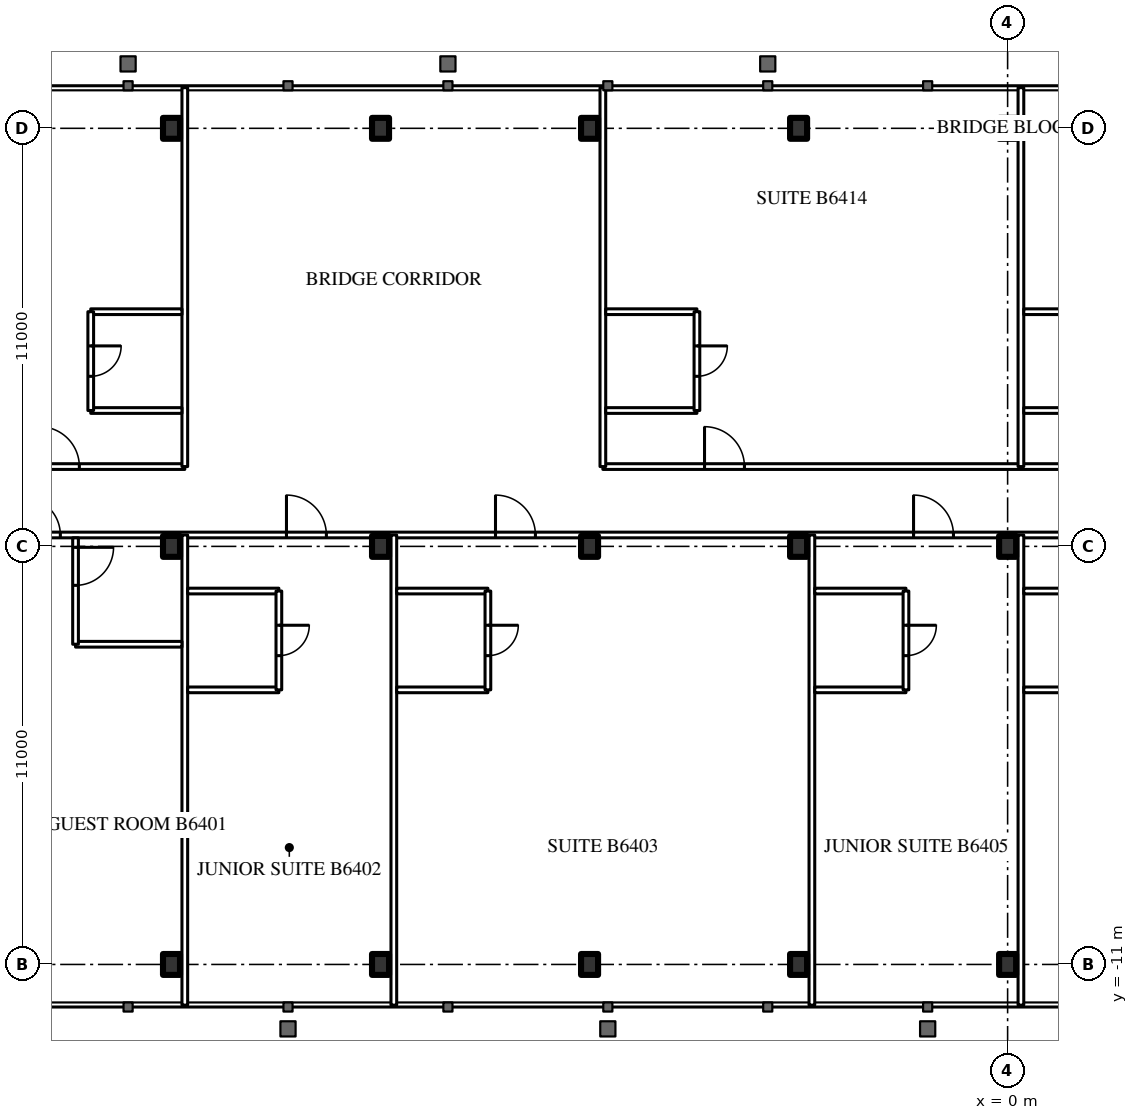
"""IFC4 building model, lengths in metres.
Left out: names, types, materials, properties, quantities, classifications, styles, units other than length and angle.
Written with IfcOpenShell. Run it as: python <this file> out.ifc"""

import sys

from ifc_helpers import new_model, si_unit, direction, frame, frame_2d, origin, origin_2d, place, context, subcontext, project, spatial, rectangle, i_section, extrude, element, fill, save


model = new_model("IFC4")
c1 = context("Model", 3, precision=1e-05, world=origin(), true_north=direction((0.0, 1.0)))
c2 = subcontext(c1, "Body", "Model", "MODEL_VIEW")
j1 = project(units=[si_unit("LENGTHUNIT", "METRE"), si_unit("PLANEANGLEUNIT", "RADIAN")], contexts=[c1])
p1 = place(None, origin())
s1 = spatial("IfcSite", under=j1, at=p1, CompositionType="ELEMENT")
p2 = place(p1, origin())
s2 = spatial("IfcBuilding", under=s1, at=p2, CompositionType="ELEMENT")
p3 = place(p2, frame((0.0, 0.0, 240.5)))
s3 = spatial("IfcBuildingStorey", under=s2, at=p3, CompositionType="ELEMENT", Elevation=240.5)
for number, where, z_axis, x_axis in (
    (1, (-22.0, -11.0, 0.0), (0.0, 0.0, 1.0), (1.0, 0.0, 0.0)),
    (2, (-16.5, -11.0, 0.0), (0.0, 0.0, 1.0), (1.0, 0.0, 0.0)),
    (3, (-11.0, -11.0, 0.0), (0.0, 0.0, 1.0), (1.0, 0.0, 0.0)),
    (4, (-5.5, -11.0, 0.0), (0.0, 0.0, 1.0), (1.0, 0.0, 0.0)),
    (5, (0.0, -11.0, 0.0), (0.0, 0.0, 1.0), (1.0, 0.0, 0.0)),
    (6, (-22.0, 0.0, 0.0), (0.0, 0.0, 1.0), (1.0, 0.0, 0.0)),
    (7, (-16.5, 0.0, 0.0), (0.0, 0.0, 1.0), (1.0, 0.0, 0.0)),
    (8, (-11.0, 0.0, 0.0), (0.0, 0.0, 1.0), (1.0, 0.0, 0.0)),
    (9, (-5.5, 0.0, 0.0), (0.0, 0.0, 1.0), (1.0, 0.0, 0.0)),
    (10, (0.0, 0.0, 0.0), (0.0, 0.0, 1.0), (1.0, 0.0, 0.0)),
    (11, (-22.0, 11.0, 0.0), (0.0, 0.0, 1.0), (1.0, 0.0, 0.0)),
    (12, (-16.5, 11.0, 0.0), (0.0, 0.0, 1.0), (1.0, 0.0, 0.0)),
    (13, (-11.0, 11.0, 0.0), (0.0, 0.0, 1.0), (1.0, 0.0, 0.0)),
    (14, (-5.5, 11.0, 0.0), (0.0, 0.0, 1.0), (1.0, 0.0, 0.0)),
    (15, (0.0, 11.0, 0.0), (0.0, 0.0, 1.0), (1.0, 0.0, 0.0)),
):
    element("IfcColumn", number, at=place(p3, frame(where, z_axis=z_axis, x_axis=x_axis)), inside=s3, PredefinedType="COLUMN", context=c2, shape_type="SweptSolid", body=[
        extrude(i_section(OverallWidth=0.448, OverallDepth=0.55, WebThickness=0.072, FlangeThickness=0.115, FilletRadius=0.02, at=origin_2d()), origin(), (0.0, 0.0, 1.0), 3.6),
    ])
p4 = place(p3, frame((-27.5, 0.3, 0.0), z_axis=(0.0, 0.0, 1.0), x_axis=(1.0, 0.0, 0.0)))
e16 = element("IfcWall", 16, at=p4, inside=s3, PredefinedType="PARTITIONING", context=c2, shape_type="SweptSolid", body=[
    extrude(rectangle(XDim=55.0, YDim=0.15, at=frame_2d((27.5, 0.0))), origin(), (0.0, 0.0, 1.0), 2.4),
])
p5 = place(p4, frame((1.575, 0.0, 0.0)))
e17 = element("IfcOpeningElement", 17, at=p5, cuts=e16, PredefinedType="OPENING", context=c2, shape_type="SweptSolid", body=[
    extrude(rectangle(XDim=1.0, YDim=2.2, at=frame_2d((0.5, 1.1))), frame((0.0, 0.085, 0.0), z_axis=(0.0, -1.0, 0.0), x_axis=(1.0, 0.0, 0.0)), (0.0, 0.0, 1.0), 0.17),
])
p6 = place(p4, frame((8.525, 0.0, 0.0)))
e18 = element("IfcOpeningElement", 18, at=p6, cuts=e16, PredefinedType="OPENING", context=c2, shape_type="SweptSolid", body=[
    extrude(rectangle(XDim=1.05, YDim=2.4, at=frame_2d((0.525, 1.2))), frame((0.0, 0.085, 0.0), z_axis=(0.0, -1.0, 0.0), x_axis=(1.0, 0.0, 0.0)), (0.0, 0.0, 1.0), 0.17),
])
p7 = place(p4, frame((14.025, 0.0, 0.0)))
e19 = element("IfcOpeningElement", 19, at=p7, cuts=e16, PredefinedType="OPENING", context=c2, shape_type="SweptSolid", body=[
    extrude(rectangle(XDim=1.05, YDim=2.4, at=frame_2d((0.525, 1.2))), frame((0.0, 0.085, 0.0), z_axis=(0.0, -1.0, 0.0), x_axis=(1.0, 0.0, 0.0)), (0.0, 0.0, 1.0), 0.17),
])
p8 = place(p4, frame((25.025, 0.0, 0.0)))
e20 = element("IfcOpeningElement", 20, at=p8, cuts=e16, PredefinedType="OPENING", context=c2, shape_type="SweptSolid", body=[
    extrude(rectangle(XDim=1.05, YDim=2.4, at=frame_2d((0.525, 1.2))), frame((0.0, 0.085, 0.0), z_axis=(0.0, -1.0, 0.0), x_axis=(1.0, 0.0, 0.0)), (0.0, 0.0, 1.0), 0.17),
])
p9 = place(p4, frame((30.525, 0.0, 0.0)))
e21 = element("IfcOpeningElement", 21, at=p9, cuts=e16, PredefinedType="OPENING", context=c2, shape_type="SweptSolid", body=[
    extrude(rectangle(XDim=1.05, YDim=2.4, at=frame_2d((0.525, 1.2))), frame((0.0, 0.085, 0.0), z_axis=(0.0, -1.0, 0.0), x_axis=(1.0, 0.0, 0.0)), (0.0, 0.0, 1.0), 0.17),
])
p10 = place(p4, frame((41.525, 0.0, 0.0)))
e22 = element("IfcOpeningElement", 22, at=p10, cuts=e16, PredefinedType="OPENING", context=c2, shape_type="SweptSolid", body=[
    extrude(rectangle(XDim=1.05, YDim=2.4, at=frame_2d((0.525, 1.2))), frame((0.0, 0.085, 0.0), z_axis=(0.0, -1.0, 0.0), x_axis=(1.0, 0.0, 0.0)), (0.0, 0.0, 1.0), 0.17),
])
p11 = place(p4, frame((47.025, 0.0, 0.0)))
e23 = element("IfcOpeningElement", 23, at=p11, cuts=e16, PredefinedType="OPENING", context=c2, shape_type="SweptSolid", body=[
    extrude(rectangle(XDim=1.05, YDim=2.4, at=frame_2d((0.525, 1.2))), frame((0.0, 0.085, 0.0), z_axis=(0.0, -1.0, 0.0), x_axis=(1.0, 0.0, 0.0)), (0.0, 0.0, 1.0), 0.17),
])
p12 = place(p4, frame((52.525, 0.0, 0.0)))
e24 = element("IfcOpeningElement", 24, at=p12, cuts=e16, PredefinedType="OPENING", context=c2, shape_type="SweptSolid", body=[
    extrude(rectangle(XDim=1.05, YDim=2.4, at=frame_2d((0.525, 1.2))), frame((0.0, 0.085, 0.0), z_axis=(0.0, -1.0, 0.0), x_axis=(1.0, 0.0, 0.0)), (0.0, 0.0, 1.0), 0.17),
])
p13 = place(p3, frame((-27.5, 2.1, 0.0), z_axis=(0.0, 0.0, 1.0), x_axis=(1.0, 0.0, 0.0)))
e25 = element("IfcWall", 25, at=p13, inside=s3, PredefinedType="PARTITIONING", context=c2, shape_type="SweptSolid", body=[
    extrude(rectangle(XDim=5.85, YDim=0.15, at=frame_2d((2.925, 0.0))), origin(), (0.0, 0.0, 1.0), 3.4),
])
p14 = place(p13, frame((2.025, 0.0, 0.0)))
e26 = element("IfcOpeningElement", 26, at=p14, cuts=e25, PredefinedType="OPENING", context=c2, shape_type="SweptSolid", body=[
    extrude(rectangle(XDim=1.05, YDim=2.4, at=frame_2d((0.525, 1.2))), frame((0.0, 0.085, 0.0), z_axis=(0.0, -1.0, 0.0), x_axis=(1.0, 0.0, 0.0)), (0.0, 0.0, 1.0), 0.17),
])
p15 = place(p3, frame((-10.65, 2.1, 0.0), z_axis=(0.0, 0.0, 1.0), x_axis=(1.0, 0.0, 0.0)))
e27 = element("IfcWall", 27, at=p15, inside=s3, PredefinedType="PARTITIONING", context=c2, shape_type="SweptSolid", body=[
    extrude(rectangle(XDim=38.15, YDim=0.15, at=frame_2d((19.075, 0.0))), origin(), (0.0, 0.0, 1.0), 3.4),
])
p16 = place(p15, frame((2.675, 0.0, 0.0)))
e28 = element("IfcOpeningElement", 28, at=p16, cuts=e27, PredefinedType="OPENING", context=c2, shape_type="SweptSolid", body=[
    extrude(rectangle(XDim=1.05, YDim=2.4, at=frame_2d((0.525, 1.2))), frame((0.0, 0.085, 0.0), z_axis=(0.0, -1.0, 0.0), x_axis=(1.0, 0.0, 0.0)), (0.0, 0.0, 1.0), 0.17),
])
p17 = place(p15, frame((13.675, 0.0, 0.0)))
e29 = element("IfcOpeningElement", 29, at=p17, cuts=e27, PredefinedType="OPENING", context=c2, shape_type="SweptSolid", body=[
    extrude(rectangle(XDim=1.05, YDim=2.4, at=frame_2d((0.525, 1.2))), frame((0.0, 0.085, 0.0), z_axis=(0.0, -1.0, 0.0), x_axis=(1.0, 0.0, 0.0)), (0.0, 0.0, 1.0), 0.17),
])
p18 = place(p15, frame((24.675, 0.0, 0.0)))
e30 = element("IfcOpeningElement", 30, at=p18, cuts=e27, PredefinedType="OPENING", context=c2, shape_type="SweptSolid", body=[
    extrude(rectangle(XDim=1.05, YDim=2.4, at=frame_2d((0.525, 1.2))), frame((0.0, 0.085, 0.0), z_axis=(0.0, -1.0, 0.0), x_axis=(1.0, 0.0, 0.0)), (0.0, 0.0, 1.0), 0.17),
])
p19 = place(p15, frame((30.175, 0.0, 0.0)))
e31 = element("IfcOpeningElement", 31, at=p19, cuts=e27, PredefinedType="OPENING", context=c2, shape_type="SweptSolid", body=[
    extrude(rectangle(XDim=1.05, YDim=2.4, at=frame_2d((0.525, 1.2))), frame((0.0, 0.085, 0.0), z_axis=(0.0, -1.0, 0.0), x_axis=(1.0, 0.0, 0.0)), (0.0, 0.0, 1.0), 0.17),
])
p20 = place(p15, frame((35.675, 0.0, 0.0)))
e32 = element("IfcOpeningElement", 32, at=p20, cuts=e27, PredefinedType="OPENING", context=c2, shape_type="SweptSolid", body=[
    extrude(rectangle(XDim=1.05, YDim=2.4, at=frame_2d((0.525, 1.2))), frame((0.0, 0.085, 0.0), z_axis=(0.0, -1.0, 0.0), x_axis=(1.0, 0.0, 0.0)), (0.0, 0.0, 1.0), 0.17),
])
for number, where, z_axis, x_axis in (
    (33, (-21.65, -12.07, 0.0), (0.0, 0.0, 1.0), (0.0, 1.0, 0.0)),
    (34, (-16.15, -12.07, 0.0), (0.0, 0.0, 1.0), (0.0, 1.0, 0.0)),
    (35, (-5.15, -12.07, 0.0), (0.0, 0.0, 1.0), (0.0, 1.0, 0.0)),
    (36, (0.35, -12.07, 0.0), (0.0, 0.0, 1.0), (0.0, 1.0, 0.0)),
):
    element("IfcWall", number, at=place(p3, frame(where, z_axis=z_axis, x_axis=x_axis)), inside=s3, PredefinedType="PARTITIONING", context=c2, shape_type="SweptSolid", body=[
        extrude(rectangle(XDim=12.37, YDim=0.15, at=frame_2d((6.185, 0.0))), origin(), (0.0, 0.0, 1.0), 3.4),
    ])
p21 = place(p3, frame((-24.525, -2.575, 0.0), z_axis=(0.0, 0.0, 1.0), x_axis=(1.0, 0.0, 0.0)))
e37 = element("IfcWall", 37, at=p21, inside=s3, PredefinedType="PARTITIONING", context=c2, shape_type="SweptSolid", body=[
    extrude(rectangle(XDim=2.8, YDim=0.15, at=frame_2d((1.4, 0.0))), origin(), (0.0, 0.0, 1.0), 3.4),
])
p22 = place(p3, frame((-24.525, -2.575, 0.0), z_axis=(0.0, 0.0, 1.0), x_axis=(0.0, 1.0, 0.0)))
e38 = element("IfcWall", 38, at=p22, inside=s3, PredefinedType="PARTITIONING", context=c2, shape_type="SweptSolid", body=[
    extrude(rectangle(XDim=2.8, YDim=0.15, at=frame_2d((1.4, 0.0))), origin(), (0.0, 0.0, 1.0), 3.4),
])
p23 = place(p22, frame((1.55, 0.0, 0.0)))
e39 = element("IfcOpeningElement", 39, at=p23, cuts=e38, PredefinedType="OPENING", context=c2, shape_type="SweptSolid", body=[
    extrude(rectangle(XDim=1.0, YDim=2.2, at=frame_2d((0.5, 1.1))), frame((0.0, 0.085, 0.0), z_axis=(0.0, -1.0, 0.0), x_axis=(1.0, 0.0, 0.0)), (0.0, 0.0, 1.0), 0.17),
])
for number, where, z_axis, x_axis in (
    (40, (-21.575, -3.775, 0.0), (0.0, 0.0, 1.0), (1.0, 0.0, 0.0)),
    (41, (-21.575, -1.175, 0.0), (0.0, 0.0, 1.0), (1.0, 0.0, 0.0)),
):
    element("IfcWall", number, at=place(p3, frame(where, z_axis=z_axis, x_axis=x_axis)), inside=s3, PredefinedType="PARTITIONING", context=c2, shape_type="SweptSolid", body=[
        extrude(rectangle(XDim=2.4, YDim=0.15, at=frame_2d((1.2, 0.0))), origin(), (0.0, 0.0, 1.0), 3.4),
    ])
p24 = place(p3, frame((-19.175, -3.775, 0.0), z_axis=(0.0, 0.0, 1.0), x_axis=(0.0, 1.0, 0.0)))
e42 = element("IfcWall", 42, at=p24, inside=s3, PredefinedType="PARTITIONING", context=c2, shape_type="SweptSolid", body=[
    extrude(rectangle(XDim=2.6, YDim=0.15, at=frame_2d((1.3, 0.0))), origin(), (0.0, 0.0, 1.0), 3.4),
])
p25 = place(p24, frame((0.9, 0.0, 0.0)))
e43 = element("IfcOpeningElement", 43, at=p25, cuts=e42, PredefinedType="OPENING", context=c2, shape_type="SweptSolid", body=[
    extrude(rectangle(XDim=0.8, YDim=2.2, at=frame_2d((0.4, 1.1))), frame((0.0, 0.085, 0.0), z_axis=(0.0, -1.0, 0.0), x_axis=(1.0, 0.0, 0.0)), (0.0, 0.0, 1.0), 0.17),
])
for number, where, z_axis, x_axis in (
    (44, (-16.075, -3.775, 0.0), (0.0, 0.0, 1.0), (1.0, 0.0, 0.0)),
    (45, (-16.075, -1.175, 0.0), (0.0, 0.0, 1.0), (1.0, 0.0, 0.0)),
):
    element("IfcWall", number, at=place(p3, frame(where, z_axis=z_axis, x_axis=x_axis)), inside=s3, PredefinedType="PARTITIONING", context=c2, shape_type="SweptSolid", body=[
        extrude(rectangle(XDim=2.4, YDim=0.15, at=frame_2d((1.2, 0.0))), origin(), (0.0, 0.0, 1.0), 3.4),
    ])
p26 = place(p3, frame((-13.675, -3.775, 0.0), z_axis=(0.0, 0.0, 1.0), x_axis=(0.0, 1.0, 0.0)))
e46 = element("IfcWall", 46, at=p26, inside=s3, PredefinedType="PARTITIONING", context=c2, shape_type="SweptSolid", body=[
    extrude(rectangle(XDim=2.6, YDim=0.15, at=frame_2d((1.3, 0.0))), origin(), (0.0, 0.0, 1.0), 3.4),
])
p27 = place(p26, frame((0.9, 0.0, 0.0)))
e47 = element("IfcOpeningElement", 47, at=p27, cuts=e46, PredefinedType="OPENING", context=c2, shape_type="SweptSolid", body=[
    extrude(rectangle(XDim=0.8, YDim=2.2, at=frame_2d((0.4, 1.1))), frame((0.0, 0.085, 0.0), z_axis=(0.0, -1.0, 0.0), x_axis=(1.0, 0.0, 0.0)), (0.0, 0.0, 1.0), 0.17),
])
for number, where, z_axis, x_axis in (
    (48, (-5.075, -3.775, 0.0), (0.0, 0.0, 1.0), (1.0, 0.0, 0.0)),
    (49, (-5.075, -1.175, 0.0), (0.0, 0.0, 1.0), (1.0, 0.0, 0.0)),
):
    element("IfcWall", number, at=place(p3, frame(where, z_axis=z_axis, x_axis=x_axis)), inside=s3, PredefinedType="PARTITIONING", context=c2, shape_type="SweptSolid", body=[
        extrude(rectangle(XDim=2.4, YDim=0.15, at=frame_2d((1.2, 0.0))), origin(), (0.0, 0.0, 1.0), 3.4),
    ])
p28 = place(p3, frame((-2.675, -3.775, 0.0), z_axis=(0.0, 0.0, 1.0), x_axis=(0.0, 1.0, 0.0)))
e50 = element("IfcWall", 50, at=p28, inside=s3, PredefinedType="PARTITIONING", context=c2, shape_type="SweptSolid", body=[
    extrude(rectangle(XDim=2.6, YDim=0.15, at=frame_2d((1.3, 0.0))), origin(), (0.0, 0.0, 1.0), 3.4),
])
p29 = place(p28, frame((0.9, 0.0, 0.0)))
e51 = element("IfcOpeningElement", 51, at=p29, cuts=e50, PredefinedType="OPENING", context=c2, shape_type="SweptSolid", body=[
    extrude(rectangle(XDim=0.8, YDim=2.2, at=frame_2d((0.4, 1.1))), frame((0.0, 0.085, 0.0), z_axis=(0.0, -1.0, 0.0), x_axis=(1.0, 0.0, 0.0)), (0.0, 0.0, 1.0), 0.17),
])
for number, where, z_axis, x_axis in (
    (52, (0.425, -3.775, 0.0), (0.0, 0.0, 1.0), (1.0, 0.0, 0.0)),
    (53, (0.425, -1.175, 0.0), (0.0, 0.0, 1.0), (1.0, 0.0, 0.0)),
):
    element("IfcWall", number, at=place(p3, frame(where, z_axis=z_axis, x_axis=x_axis)), inside=s3, PredefinedType="PARTITIONING", context=c2, shape_type="SweptSolid", body=[
        extrude(rectangle(XDim=2.4, YDim=0.15, at=frame_2d((1.2, 0.0))), origin(), (0.0, 0.0, 1.0), 3.4),
    ])
for number, where, z_axis, x_axis in (
    (54, (-21.65, 2.1, 0.0), (0.0, 0.0, 1.0), (0.0, 1.0, 0.0)),
    (55, (-10.65, 2.1, 0.0), (0.0, 0.0, 1.0), (0.0, 1.0, 0.0)),
    (56, (0.35, 2.1, 0.0), (0.0, 0.0, 1.0), (0.0, 1.0, 0.0)),
):
    element("IfcWall", number, at=place(p3, frame(where, z_axis=z_axis, x_axis=x_axis)), inside=s3, PredefinedType="PARTITIONING", context=c2, shape_type="SweptSolid", body=[
        extrude(rectangle(XDim=9.97, YDim=0.15, at=frame_2d((4.985, 0.0))), origin(), (0.0, 0.0, 1.0), 3.4),
    ])
for number, where, z_axis, x_axis in (
    (57, (-24.125, 6.175, 0.0), (0.0, 0.0, 1.0), (1.0, 0.0, 0.0)),
    (58, (-24.125, 3.575, 0.0), (0.0, 0.0, 1.0), (1.0, 0.0, 0.0)),
):
    element("IfcWall", number, at=place(p3, frame(where, z_axis=z_axis, x_axis=x_axis)), inside=s3, PredefinedType="PARTITIONING", context=c2, shape_type="SweptSolid", body=[
        extrude(rectangle(XDim=2.4, YDim=0.15, at=frame_2d((1.2, 0.0))), origin(), (0.0, 0.0, 1.0), 3.4),
    ])
p30 = place(p3, frame((-24.125, 3.575, 0.0), z_axis=(0.0, 0.0, 1.0), x_axis=(0.0, 1.0, 0.0)))
e59 = element("IfcWall", 59, at=p30, inside=s3, PredefinedType="PARTITIONING", context=c2, shape_type="SweptSolid", body=[
    extrude(rectangle(XDim=2.6, YDim=0.15, at=frame_2d((1.3, 0.0))), origin(), (0.0, 0.0, 1.0), 3.4),
])
p31 = place(p30, frame((0.9, 0.0, 0.0)))
e60 = element("IfcOpeningElement", 60, at=p31, cuts=e59, PredefinedType="OPENING", context=c2, shape_type="SweptSolid", body=[
    extrude(rectangle(XDim=0.8, YDim=2.2, at=frame_2d((0.4, 1.1))), frame((0.0, 0.085, 0.0), z_axis=(0.0, -1.0, 0.0), x_axis=(1.0, 0.0, 0.0)), (0.0, 0.0, 1.0), 0.17),
])
for number, where, z_axis, x_axis in (
    (61, (-10.575, 6.175, 0.0), (0.0, 0.0, 1.0), (1.0, 0.0, 0.0)),
    (62, (-10.575, 3.575, 0.0), (0.0, 0.0, 1.0), (1.0, 0.0, 0.0)),
):
    element("IfcWall", number, at=place(p3, frame(where, z_axis=z_axis, x_axis=x_axis)), inside=s3, PredefinedType="PARTITIONING", context=c2, shape_type="SweptSolid", body=[
        extrude(rectangle(XDim=2.4, YDim=0.15, at=frame_2d((1.2, 0.0))), origin(), (0.0, 0.0, 1.0), 3.4),
    ])
p32 = place(p3, frame((-8.175, 3.575, 0.0), z_axis=(0.0, 0.0, 1.0), x_axis=(0.0, 1.0, 0.0)))
e63 = element("IfcWall", 63, at=p32, inside=s3, PredefinedType="PARTITIONING", context=c2, shape_type="SweptSolid", body=[
    extrude(rectangle(XDim=2.6, YDim=0.15, at=frame_2d((1.3, 0.0))), origin(), (0.0, 0.0, 1.0), 3.4),
])
p33 = place(p32, frame((0.9, 0.0, 0.0)))
e64 = element("IfcOpeningElement", 64, at=p33, cuts=e63, PredefinedType="OPENING", context=c2, shape_type="SweptSolid", body=[
    extrude(rectangle(XDim=0.8, YDim=2.2, at=frame_2d((0.4, 1.1))), frame((0.0, 0.085, 0.0), z_axis=(0.0, -1.0, 0.0), x_axis=(1.0, 0.0, 0.0)), (0.0, 0.0, 1.0), 0.17),
])
for number, where, z_axis, x_axis in (
    (65, (0.425, 6.175, 0.0), (0.0, 0.0, 1.0), (1.0, 0.0, 0.0)),
    (66, (0.425, 3.575, 0.0), (0.0, 0.0, 1.0), (1.0, 0.0, 0.0)),
):
    element("IfcWall", number, at=place(p3, frame(where, z_axis=z_axis, x_axis=x_axis)), inside=s3, PredefinedType="PARTITIONING", context=c2, shape_type="SweptSolid", body=[
        extrude(rectangle(XDim=2.4, YDim=0.15, at=frame_2d((1.2, 0.0))), origin(), (0.0, 0.0, 1.0), 3.4),
    ])
p34 = place(p23, origin())
e67 = element("IfcDoor", 67, at=p34, inside=s3, OperationType="SINGLE_SWING_RIGHT", PredefinedType="DOOR", context=c2, shape_type="SweptSolid", body=[
    extrude(rectangle(XDim=1.0, YDim=2.2, at=frame_2d((0.5, 1.1))), frame((0.0, 0.025, 0.0), z_axis=(0.0, -1.0, 0.0), x_axis=(1.0, 0.0, 0.0)), (0.0, 0.0, 1.0), 0.05),
])
fill(e39, e67)
p35 = place(p5, origin())
e68 = element("IfcDoor", 68, at=p35, inside=s3, OperationType="SINGLE_SWING_LEFT", PredefinedType="DOOR", context=c2, shape_type="SweptSolid", body=[
    extrude(rectangle(XDim=1.0, YDim=2.2, at=frame_2d((0.5, 1.1))), frame((0.0, 0.025, 0.0), z_axis=(0.0, -1.0, 0.0), x_axis=(1.0, 0.0, 0.0)), (0.0, 0.0, 1.0), 0.05),
])
fill(e17, e68)
p36 = place(p25, origin())
e69 = element("IfcDoor", 69, at=p36, inside=s3, OperationType="SINGLE_SWING_RIGHT", PredefinedType="DOOR", context=c2, shape_type="SweptSolid", body=[
    extrude(rectangle(XDim=0.8, YDim=2.2, at=frame_2d((0.4, 1.1))), frame((0.0, 0.025, 0.0), z_axis=(0.0, -1.0, 0.0), x_axis=(1.0, 0.0, 0.0)), (0.0, 0.0, 1.0), 0.05),
])
fill(e43, e69)
p37 = place(p6, origin())
e70 = element("IfcDoor", 70, at=p37, inside=s3, OperationType="SINGLE_SWING_LEFT", PredefinedType="DOOR", context=c2, shape_type="SweptSolid", body=[
    extrude(rectangle(XDim=1.05, YDim=2.4, at=frame_2d((0.525, 1.2))), frame((0.0, 0.025, 0.0), z_axis=(0.0, -1.0, 0.0), x_axis=(1.0, 0.0, 0.0)), (0.0, 0.0, 1.0), 0.05),
])
fill(e18, e70)
p38 = place(p27, origin())
e71 = element("IfcDoor", 71, at=p38, inside=s3, OperationType="SINGLE_SWING_RIGHT", PredefinedType="DOOR", context=c2, shape_type="SweptSolid", body=[
    extrude(rectangle(XDim=0.8, YDim=2.2, at=frame_2d((0.4, 1.1))), frame((0.0, 0.025, 0.0), z_axis=(0.0, -1.0, 0.0), x_axis=(1.0, 0.0, 0.0)), (0.0, 0.0, 1.0), 0.05),
])
fill(e47, e71)
p39 = place(p7, origin())
e72 = element("IfcDoor", 72, at=p39, inside=s3, OperationType="SINGLE_SWING_LEFT", PredefinedType="DOOR", context=c2, shape_type="SweptSolid", body=[
    extrude(rectangle(XDim=1.05, YDim=2.4, at=frame_2d((0.525, 1.2))), frame((0.0, 0.025, 0.0), z_axis=(0.0, -1.0, 0.0), x_axis=(1.0, 0.0, 0.0)), (0.0, 0.0, 1.0), 0.05),
])
fill(e19, e72)
p40 = place(p29, origin())
e73 = element("IfcDoor", 73, at=p40, inside=s3, OperationType="SINGLE_SWING_RIGHT", PredefinedType="DOOR", context=c2, shape_type="SweptSolid", body=[
    extrude(rectangle(XDim=0.8, YDim=2.2, at=frame_2d((0.4, 1.1))), frame((0.0, 0.025, 0.0), z_axis=(0.0, -1.0, 0.0), x_axis=(1.0, 0.0, 0.0)), (0.0, 0.0, 1.0), 0.05),
])
fill(e51, e73)
p41 = place(p8, origin())
e74 = element("IfcDoor", 74, at=p41, inside=s3, OperationType="SINGLE_SWING_LEFT", PredefinedType="DOOR", context=c2, shape_type="SweptSolid", body=[
    extrude(rectangle(XDim=1.05, YDim=2.4, at=frame_2d((0.525, 1.2))), frame((0.0, 0.025, 0.0), z_axis=(0.0, -1.0, 0.0), x_axis=(1.0, 0.0, 0.0)), (0.0, 0.0, 1.0), 0.05),
])
fill(e20, e74)
p42 = place(p31, origin())
e75 = element("IfcDoor", 75, at=p42, inside=s3, OperationType="SINGLE_SWING_RIGHT", PredefinedType="DOOR", context=c2, shape_type="SweptSolid", body=[
    extrude(rectangle(XDim=0.8, YDim=2.2, at=frame_2d((0.4, 1.1))), frame((0.0, 0.025, 0.0), z_axis=(0.0, -1.0, 0.0), x_axis=(1.0, 0.0, 0.0)), (0.0, 0.0, 1.0), 0.05),
])
fill(e60, e75)
p43 = place(p14, origin())
e76 = element("IfcDoor", 76, at=p43, inside=s3, OperationType="SINGLE_SWING_LEFT", PredefinedType="DOOR", context=c2, shape_type="SweptSolid", body=[
    extrude(rectangle(XDim=1.05, YDim=2.4, at=frame_2d((0.525, 1.2))), frame((0.0, 0.025, 0.0), z_axis=(0.0, -1.0, 0.0), x_axis=(1.0, 0.0, 0.0)), (0.0, 0.0, 1.0), 0.05),
])
fill(e26, e76)
p44 = place(p33, origin())
e77 = element("IfcDoor", 77, at=p44, inside=s3, OperationType="SINGLE_SWING_RIGHT", PredefinedType="DOOR", context=c2, shape_type="SweptSolid", body=[
    extrude(rectangle(XDim=0.8, YDim=2.2, at=frame_2d((0.4, 1.1))), frame((0.0, 0.025, 0.0), z_axis=(0.0, -1.0, 0.0), x_axis=(1.0, 0.0, 0.0)), (0.0, 0.0, 1.0), 0.05),
])
fill(e64, e77)
p45 = place(p16, origin())
e78 = element("IfcDoor", 78, at=p45, inside=s3, OperationType="SINGLE_SWING_LEFT", PredefinedType="DOOR", context=c2, shape_type="SweptSolid", body=[
    extrude(rectangle(XDim=1.05, YDim=2.4, at=frame_2d((0.525, 1.2))), frame((0.0, 0.025, 0.0), z_axis=(0.0, -1.0, 0.0), x_axis=(1.0, 0.0, 0.0)), (0.0, 0.0, 1.0), 0.05),
])
fill(e28, e78)
save(model, sys.argv[1])
